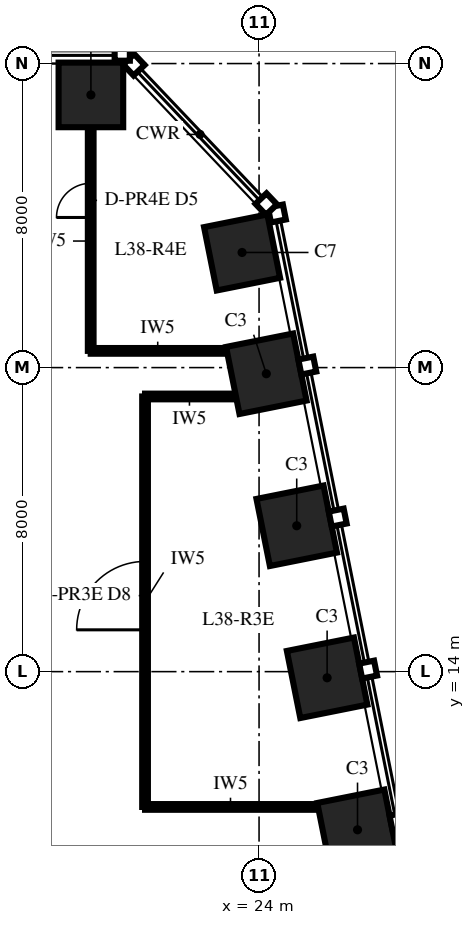
"""IFC4 building model, lengths in metres.
Left out: names, types, materials, properties, quantities, classifications, styles, units other than length and angle.
Written with IfcOpenShell. Run it as: python <this file> out.ifc"""

import sys

from ifc_helpers import new_model, si_unit, direction, frame, frame_2d, origin, origin_2d, place, context, subcontext, project, spatial, rectangle, extrude, element, fill, save


model = new_model("IFC4")
c1 = context("Model", 3, precision=1e-05, world=origin(), true_north=direction((0.0, 1.0)))
c2 = subcontext(c1, "Body", "Model", "MODEL_VIEW")
j1 = project(units=[si_unit("LENGTHUNIT", "METRE"), si_unit("PLANEANGLEUNIT", "RADIAN")], contexts=[c1])
p1 = place(None, origin())
s1 = spatial("IfcSite", under=j1, at=p1, CompositionType="ELEMENT")
p2 = place(p1, origin())
s2 = spatial("IfcBuilding", under=s1, at=p2, CompositionType="ELEMENT")
p3 = place(p2, frame((0.0, 0.0, 167.0)))
s3 = spatial("IfcBuildingStorey", under=s2, at=p3, CompositionType="ELEMENT", Elevation=167.0)
for number, where, z_axis, x_axis in (
    (1, (26.591, 9.838, 0.0), (0.0, 0.0, 1.0), (-0.196, 0.981, 0.0)),
    (2, (25.791, 13.838, 0.0), (0.0, 0.0, 1.0), (-0.196, 0.981, 0.0)),
    (3, (24.991, 17.838, 0.0), (0.0, 0.0, 1.0), (-0.196, 0.981, 0.0)),
    (4, (24.191, 21.838, 0.0), (0.0, 0.0, 1.0), (-0.196, 0.981, 0.0)),
):
    element("IfcColumn", number, at=place(p3, frame(where, z_axis=z_axis, x_axis=x_axis)), inside=s3, PredefinedType="COLUMN", context=c2, shape_type="SweptSolid", body=[
        extrude(rectangle(XDim=1.8, YDim=1.8, at=origin_2d()), origin(), (0.0, 0.0, 1.0), 6.0),
    ])
for number, where, z_axis, x_axis in (
    (5, (23.553, 25.029, 0.0), (0.0, 0.0, 1.0), (-0.196, 0.981, 0.0)),
    (6, (19.575, 29.175, 0.0), (0.0, 0.0, 1.0), (-1.0, 0.0, 0.0)),
):
    element("IfcColumn", number, at=place(p3, frame(where, z_axis=z_axis, x_axis=x_axis)), inside=s3, PredefinedType="COLUMN", context=c2, shape_type="SweptSolid", body=[
        extrude(rectangle(XDim=1.7, YDim=1.7, at=origin_2d()), origin(), (0.0, 0.0, 1.0), 6.0),
    ])
p4 = place(p3, frame((21.0, 10.44, 0.0), z_axis=(0.0, 0.0, 1.0), x_axis=(0.0, 1.0, 0.0)))
e7 = element("IfcWall", 7, at=p4, inside=s3, PredefinedType="PARTITIONING", context=c2, shape_type="SweptSolid", body=[
    extrude(rectangle(XDim=10.8, YDim=0.15, at=frame_2d((5.4, 0.0))), origin(), (0.0, 0.0, 1.0), 5.8),
])
p5 = place(p4, frame((4.66, 0.0, 0.0)))
e8 = element("IfcOpeningElement", 8, at=p5, cuts=e7, PredefinedType="OPENING", context=c2, shape_type="SweptSolid", body=[
    extrude(rectangle(XDim=1.8, YDim=2.4, at=frame_2d((0.9, 1.2))), frame((0.0, 0.09, 0.0), z_axis=(0.0, -1.0, 0.0), x_axis=(1.0, 0.0, 0.0)), (0.0, 0.0, 1.0), 0.18),
])
p6 = place(p3, frame((21.0, 10.44, 0.0), z_axis=(0.0, 0.0, 1.0), x_axis=(1.0, 0.0, 0.0)))
e9 = element("IfcWall", 9, at=p6, inside=s3, PredefinedType="PARTITIONING", context=c2, shape_type="SweptSolid", body=[
    extrude(rectangle(XDim=4.497, YDim=0.15, at=frame_2d((2.248, 0.0))), origin(), (0.0, 0.0, 1.0), 5.8),
])
p7 = place(p3, frame((21.0, 21.24, 0.0), z_axis=(0.0, 0.0, 1.0), x_axis=(1.0, 0.0, 0.0)))
e10 = element("IfcWall", 10, at=p7, inside=s3, PredefinedType="PARTITIONING", context=c2, shape_type="SweptSolid", body=[
    extrude(rectangle(XDim=2.337, YDim=0.15, at=frame_2d((1.168, 0.0))), origin(), (0.0, 0.0, 1.0), 5.8),
])
p8 = place(p3, frame((19.57, 22.44, 0.0), z_axis=(0.0, 0.0, 1.0), x_axis=(1.0, 0.0, 0.0)))
e11 = element("IfcWall", 11, at=p8, inside=s3, PredefinedType="PARTITIONING", context=c2, shape_type="SweptSolid", body=[
    extrude(rectangle(XDim=3.527, YDim=0.15, at=frame_2d((1.763, 0.0))), origin(), (0.0, 0.0, 1.0), 5.8),
])
p9 = place(p3, frame((19.57, 22.44, 0.0), z_axis=(0.0, 0.0, 1.0), x_axis=(0.0, 1.0, 0.0)))
e12 = element("IfcWall", 12, at=p9, inside=s3, PredefinedType="PARTITIONING", context=c2, shape_type="SweptSolid", body=[
    extrude(rectangle(XDim=5.78, YDim=0.15, at=frame_2d((2.89, 0.0))), origin(), (0.0, 0.0, 1.0), 5.368),
])
p10 = place(p9, frame((3.51, 0.0, 0.0)))
e13 = element("IfcOpeningElement", 13, at=p10, cuts=e12, PredefinedType="OPENING", context=c2, shape_type="SweptSolid", body=[
    extrude(rectangle(XDim=0.9, YDim=2.1, at=frame_2d((0.45, 1.05))), frame((0.0, 0.09, 0.0), z_axis=(0.0, -1.0, 0.0), x_axis=(1.0, 0.0, 0.0)), (0.0, 0.0, 1.0), 0.18),
])
p11 = place(p5, origin())
e14 = element("IfcDoor", 14, at=p11, inside=s3, OperationType="DOUBLE_DOOR_SINGLE_SWING", PredefinedType="DOOR", context=c2, shape_type="SweptSolid", body=[
    extrude(rectangle(XDim=1.8, YDim=2.4, at=frame_2d((0.9, 1.2))), frame((0.0, 0.075, 0.0), z_axis=(0.0, -1.0, 0.0), x_axis=(1.0, 0.0, 0.0)), (0.0, 0.0, 1.0), 0.149),
])
fill(e8, e14)
p12 = place(p10, origin())
e15 = element("IfcDoor", 15, at=p12, inside=s3, OperationType="SINGLE_SWING_LEFT", PredefinedType="DOOR", context=c2, shape_type="SweptSolid", body=[
    extrude(rectangle(XDim=0.9, YDim=2.1, at=frame_2d((0.45, 1.05))), frame((0.0, 0.075, 0.0), z_axis=(0.0, -1.0, 0.0), x_axis=(1.0, 0.0, 0.0)), (0.0, 0.0, 1.0), 0.149),
])
fill(e13, e15)
save(model, sys.argv[1])
